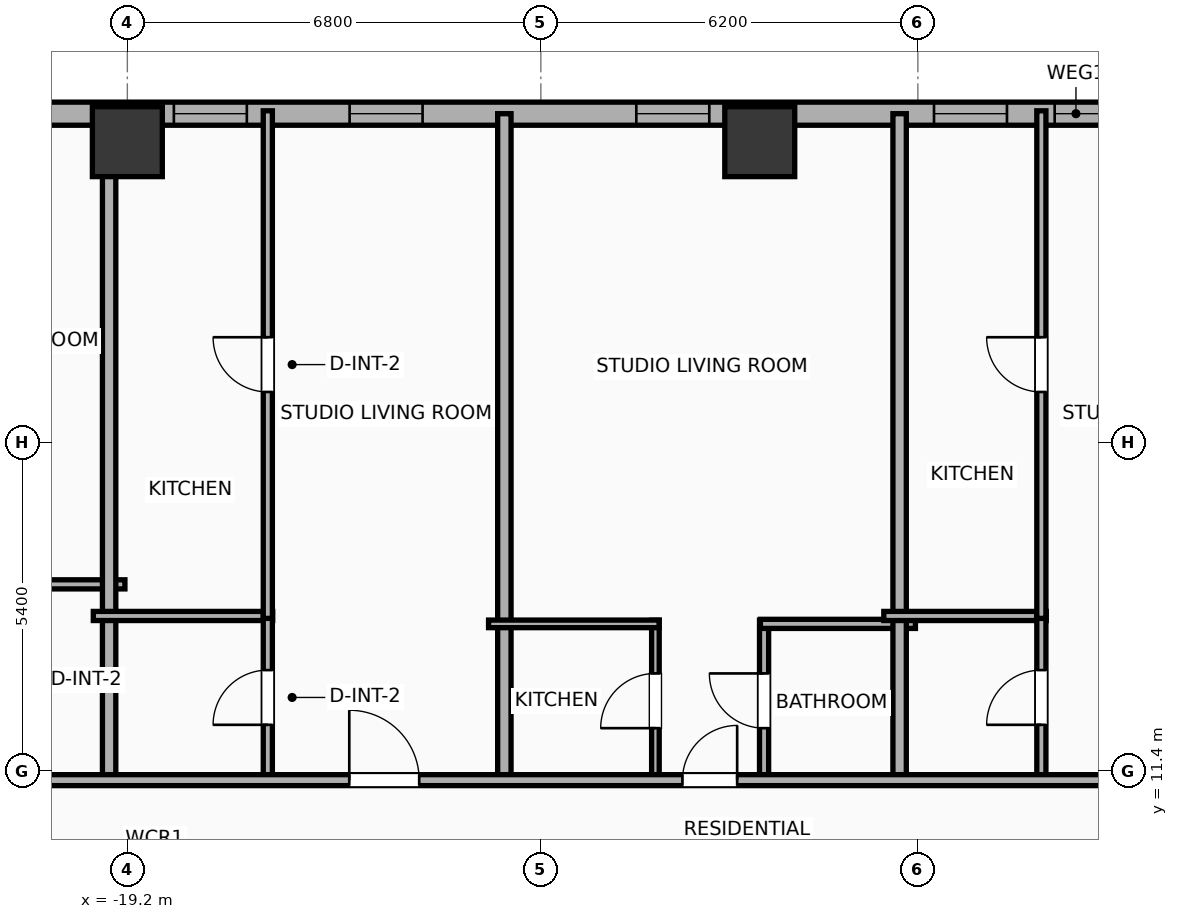
"""IFC4 building model, lengths in metres.
Left out: names, types, materials, properties, quantities, classifications, styles, units other than length and angle.
Written with IfcOpenShell. Run it as: python <this file> out.ifc"""

import sys

from ifc_helpers import new_model, si_unit, direction, frame, frame_2d, origin, origin_2d, place, context, subcontext, project, spatial, rectangle, hollow_rectangle, extrude, element, fill, save


model = new_model("IFC4")
c1 = context("Model", 3, precision=1e-05, world=origin(), true_north=direction((0.0, 1.0)))
c2 = subcontext(c1, "Body", "Model", "MODEL_VIEW")
j1 = project(units=[si_unit("LENGTHUNIT", "METRE"), si_unit("PLANEANGLEUNIT", "RADIAN")], contexts=[c1])
p1 = place(None, origin())
s1 = spatial("IfcSite", under=j1, at=p1, CompositionType="ELEMENT")
p2 = place(p1, origin())
s2 = spatial("IfcBuilding", under=s1, at=p2, CompositionType="ELEMENT")
p3 = place(p2, frame((0.0, 0.0, 76.7)))
s3 = spatial("IfcBuildingStorey", under=s2, at=p3, CompositionType="ELEMENT", Elevation=76.7)
for number, where, z_axis, x_axis in (
    (1, (-8.8, 21.75, 0.0), (0.0, 0.0, 1.0), (1.0, 0.0, 0.0)),
    (2, (-19.2, 21.75, 0.0), (0.0, 0.0, 1.0), (1.0, 0.0, 0.0)),
):
    element("IfcColumn", number, at=place(p3, frame(where, z_axis=z_axis, x_axis=x_axis)), inside=s3, PredefinedType="COLUMN", context=c2, shape_type="SweptSolid", body=[
        extrude(hollow_rectangle(XDim=1.15, YDim=1.15, WallThickness=0.04, at=origin_2d()), origin(), (0.0, 0.0, 1.0), 3.9),
    ])
p4 = place(p3, frame((-29.581, 22.21, 0.0), z_axis=(0.0, 0.0, 1.0), x_axis=(1.0, 0.0, 0.0)))
e3 = element("IfcWall", 3, at=p4, inside=s3, PredefinedType="ELEMENTEDWALL", context=c2, shape_type="SweptSolid", body=[
    extrude(rectangle(XDim=51.963, YDim=0.38, at=frame_2d((25.981, 0.0))), origin(), (0.0, 0.0, 1.0), 3.6),
])
p5 = place(p4, frame((25.631, 0.0, 0.75)))
e4 = element("IfcOpeningElement", 4, at=p5, cuts=e3, PredefinedType="OPENING", context=c2, shape_type="SweptSolid", body=[
    extrude(rectangle(XDim=2.4, YDim=2.1, at=frame_2d((1.2, 1.05))), frame((0.0, 0.2, 0.0), z_axis=(0.0, -1.0, 0.0), x_axis=(1.0, 0.0, 0.0)), (0.0, 0.0, 1.0), 0.4),
])
p6 = place(p4, frame((42.952, 0.0, 0.75)))
e5 = element("IfcOpeningElement", 5, at=p6, cuts=e3, PredefinedType="OPENING", context=c2, shape_type="SweptSolid", body=[
    extrude(rectangle(XDim=2.4, YDim=2.1, at=frame_2d((1.2, 1.05))), frame((0.0, 0.2, 0.0), z_axis=(0.0, -1.0, 0.0), x_axis=(1.0, 0.0, 0.0)), (0.0, 0.0, 1.0), 0.4),
])
p7 = place(p4, frame((1.406, 0.0, 0.75)))
e6 = element("IfcOpeningElement", 6, at=p7, cuts=e3, PredefinedType="OPENING", context=c2, shape_type="SweptSolid", body=[
    extrude(rectangle(XDim=1.2, YDim=2.05, at=frame_2d((0.6, 1.025))), frame((0.0, 0.2, 0.0), z_axis=(0.0, -1.0, 0.0), x_axis=(1.0, 0.0, 0.0)), (0.0, 0.0, 1.0), 0.4),
])
p8 = place(p4, frame((4.297, 0.0, 0.75)))
e7 = element("IfcOpeningElement", 7, at=p8, cuts=e3, PredefinedType="OPENING", context=c2, shape_type="SweptSolid", body=[
    extrude(rectangle(XDim=1.2, YDim=2.05, at=frame_2d((0.6, 1.025))), frame((0.0, 0.2, 0.0), z_axis=(0.0, -1.0, 0.0), x_axis=(1.0, 0.0, 0.0)), (0.0, 0.0, 1.0), 0.4),
])
p9 = place(p4, frame((7.776, 0.0, 0.75)))
e8 = element("IfcOpeningElement", 8, at=p9, cuts=e3, PredefinedType="OPENING", context=c2, shape_type="SweptSolid", body=[
    extrude(rectangle(XDim=1.2, YDim=2.05, at=frame_2d((0.6, 1.025))), frame((0.0, 0.2, 0.0), z_axis=(0.0, -1.0, 0.0), x_axis=(1.0, 0.0, 0.0)), (0.0, 0.0, 1.0), 0.4),
])
p10 = place(p4, frame((14.036, 0.0, 0.75)))
e9 = element("IfcOpeningElement", 9, at=p10, cuts=e3, PredefinedType="OPENING", context=c2, shape_type="SweptSolid", body=[
    extrude(rectangle(XDim=1.2, YDim=2.05, at=frame_2d((0.6, 1.025))), frame((0.0, 0.2, 0.0), z_axis=(0.0, -1.0, 0.0), x_axis=(1.0, 0.0, 0.0)), (0.0, 0.0, 1.0), 0.4),
])
p11 = place(p4, frame((11.146, 0.0, 0.75)))
e10 = element("IfcOpeningElement", 10, at=p11, cuts=e3, PredefinedType="OPENING", context=c2, shape_type="SweptSolid", body=[
    extrude(rectangle(XDim=1.2, YDim=2.05, at=frame_2d((0.6, 1.025))), frame((0.0, 0.2, 0.0), z_axis=(0.0, -1.0, 0.0), x_axis=(1.0, 0.0, 0.0)), (0.0, 0.0, 1.0), 0.4),
])
p12 = place(p4, frame((18.751, 0.0, 0.75)))
e11 = element("IfcOpeningElement", 11, at=p12, cuts=e3, PredefinedType="OPENING", context=c2, shape_type="SweptSolid", body=[
    extrude(rectangle(XDim=1.2, YDim=2.05, at=frame_2d((0.6, 1.025))), frame((0.0, 0.2, 0.0), z_axis=(0.0, -1.0, 0.0), x_axis=(1.0, 0.0, 0.0)), (0.0, 0.0, 1.0), 0.4),
])
p13 = place(p4, frame((23.647, 0.0, 0.75)))
e12 = element("IfcOpeningElement", 12, at=p13, cuts=e3, PredefinedType="OPENING", context=c2, shape_type="SweptSolid", body=[
    extrude(rectangle(XDim=1.2, YDim=2.05, at=frame_2d((0.6, 1.025))), frame((0.0, 0.2, 0.0), z_axis=(0.0, -1.0, 0.0), x_axis=(1.0, 0.0, 0.0)), (0.0, 0.0, 1.0), 0.4),
])
p14 = place(p4, frame((32.006, 0.0, 0.75)))
e13 = element("IfcOpeningElement", 13, at=p14, cuts=e3, PredefinedType="OPENING", context=c2, shape_type="SweptSolid", body=[
    extrude(rectangle(XDim=1.2, YDim=2.05, at=frame_2d((0.6, 1.025))), frame((0.0, 0.2, 0.0), z_axis=(0.0, -1.0, 0.0), x_axis=(1.0, 0.0, 0.0)), (0.0, 0.0, 1.0), 0.4),
])
p15 = place(p4, frame((34.176, 0.0, 0.75)))
e14 = element("IfcOpeningElement", 14, at=p15, cuts=e3, PredefinedType="OPENING", context=c2, shape_type="SweptSolid", body=[
    extrude(rectangle(XDim=1.2, YDim=2.05, at=frame_2d((0.6, 1.025))), frame((0.0, 0.2, 0.0), z_axis=(0.0, -1.0, 0.0), x_axis=(1.0, 0.0, 0.0)), (0.0, 0.0, 1.0), 0.4),
])
p16 = place(p4, frame((37.063, 0.0, 0.75)))
e15 = element("IfcOpeningElement", 15, at=p16, cuts=e3, PredefinedType="OPENING", context=c2, shape_type="SweptSolid", body=[
    extrude(rectangle(XDim=1.2, YDim=2.05, at=frame_2d((0.6, 1.025))), frame((0.0, 0.2, 0.0), z_axis=(0.0, -1.0, 0.0), x_axis=(1.0, 0.0, 0.0)), (0.0, 0.0, 1.0), 0.4),
])
p17 = place(p4, frame((39.509, 0.0, 0.75)))
e16 = element("IfcOpeningElement", 16, at=p17, cuts=e3, PredefinedType="OPENING", context=c2, shape_type="SweptSolid", body=[
    extrude(rectangle(XDim=1.2, YDim=2.05, at=frame_2d((0.6, 1.025))), frame((0.0, 0.2, 0.0), z_axis=(0.0, -1.0, 0.0), x_axis=(1.0, 0.0, 0.0)), (0.0, 0.0, 1.0), 0.4),
])
p18 = place(p4, frame((46.921, 0.0, 0.75)))
e17 = element("IfcOpeningElement", 17, at=p18, cuts=e3, PredefinedType="OPENING", context=c2, shape_type="SweptSolid", body=[
    extrude(rectangle(XDim=1.2, YDim=2.05, at=frame_2d((0.6, 1.025))), frame((0.0, 0.2, 0.0), z_axis=(0.0, -1.0, 0.0), x_axis=(1.0, 0.0, 0.0)), (0.0, 0.0, 1.0), 0.4),
])
p19 = place(p4, frame((49.55, 0.0, 0.75)))
e18 = element("IfcOpeningElement", 18, at=p19, cuts=e3, PredefinedType="OPENING", context=c2, shape_type="SweptSolid", body=[
    extrude(rectangle(XDim=1.2, YDim=2.05, at=frame_2d((0.6, 1.025))), frame((0.0, 0.2, 0.0), z_axis=(0.0, -1.0, 0.0), x_axis=(1.0, 0.0, 0.0)), (0.0, 0.0, 1.0), 0.4),
])
p20 = place(p3, frame((-23.03, 14.47, 0.0), z_axis=(0.0, 0.0, 1.0), x_axis=(1.0, 0.0, 0.0)))
e19 = element("IfcWall", 19, at=p20, inside=s3, PredefinedType="PLUMBINGWALL", context=c2, shape_type="SweptSolid", body=[
    extrude(rectangle(XDim=3.79, YDim=0.15, at=frame_2d((1.895, 0.0))), origin(), (0.0, 0.0, 1.0), 3.6),
])
p21 = place(p3, frame((-19.5, 11.17, 0.0), z_axis=(0.0, 0.0, 1.0), x_axis=(0.0, 1.0, 0.0)))
e20 = element("IfcWall", 20, at=p21, inside=s3, PredefinedType="PARTITIONING", context=c2, shape_type="SweptSolid", body=[
    extrude(rectangle(XDim=11.04, YDim=0.22, at=frame_2d((5.52, 0.0))), origin(), (0.0, 0.0, 1.0), 2.89),
])
p22 = place(p3, frame((-19.76, 13.95, 0.0), z_axis=(0.0, 0.0, 1.0), x_axis=(1.0, 0.0, 0.0)))
e21 = element("IfcWall", 21, at=p22, inside=s3, PredefinedType="PLUMBINGWALL", context=c2, shape_type="SweptSolid", body=[
    extrude(rectangle(XDim=2.95, YDim=0.15, at=frame_2d((1.475, 0.0))), origin(), (0.0, 0.0, 1.0), 3.6),
])
p23 = place(p3, frame((-16.89, 11.23, 0.0), z_axis=(0.0, 0.0, 1.0), x_axis=(0.0, 1.0, 0.0)))
e22 = element("IfcWall", 22, at=p23, inside=s3, PredefinedType="PLUMBINGWALL", context=c2, shape_type="SweptSolid", body=[
    extrude(rectangle(XDim=2.76, YDim=0.15, at=frame_2d((1.38, 0.0))), origin(), (0.0, 0.0, 1.0), 3.6),
])
p24 = place(p23, frame((0.93, 0.0, 0.0)))
e23 = element("IfcOpeningElement", 23, at=p24, cuts=e22, PredefinedType="OPENING", context=c2, shape_type="SweptSolid", body=[
    extrude(rectangle(XDim=0.9, YDim=2.05, at=frame_2d((0.45, 1.025))), frame((0.0, 0.085, 0.0), z_axis=(0.0, -1.0, 0.0), x_axis=(1.0, 0.0, 0.0)), (0.0, 0.0, 1.0), 0.17),
])
p25 = place(p3, frame((-16.89, 13.91, 0.0), z_axis=(0.0, 0.0, 1.0), x_axis=(0.0, 1.0, 0.0)))
e24 = element("IfcWall", 24, at=p25, inside=s3, PredefinedType="PLUMBINGWALL", context=c2, shape_type="SweptSolid", body=[
    extrude(rectangle(XDim=8.348, YDim=0.15, at=frame_2d((4.174, 0.0))), origin(), (0.0, 0.0, 1.0), 3.6),
])
p26 = place(p25, frame((3.724, 0.0, 0.0)))
e25 = element("IfcOpeningElement", 25, at=p26, cuts=e24, PredefinedType="OPENING", context=c2, shape_type="SweptSolid", body=[
    extrude(rectangle(XDim=0.9, YDim=2.05, at=frame_2d((0.45, 1.025))), frame((0.0, 0.085, 0.0), z_axis=(0.0, -1.0, 0.0), x_axis=(1.0, 0.0, 0.0)), (0.0, 0.0, 1.0), 0.17),
])
p27 = place(p3, frame((-13.0, 11.17, 0.0), z_axis=(0.0, 0.0, 1.0), x_axis=(0.0, 1.0, 0.0)))
e26 = element("IfcWall", 26, at=p27, inside=s3, PredefinedType="PARTITIONING", context=c2, shape_type="SweptSolid", body=[
    extrude(rectangle(XDim=11.04, YDim=0.22, at=frame_2d((5.52, 0.0))), origin(), (0.0, 0.0, 1.0), 3.6),
])
p28 = place(p3, frame((-10.516, 11.23, 0.0), z_axis=(0.0, 0.0, 1.0), x_axis=(0.0, 1.0, 0.0)))
e27 = element("IfcWall", 27, at=p28, inside=s3, PredefinedType="PARTITIONING", context=c2, shape_type="SweptSolid", body=[
    extrude(rectangle(XDim=2.65, YDim=0.125, at=frame_2d((1.325, 0.0))), origin(), (0.0, 0.0, 1.0), 3.6),
])
p29 = place(p28, frame((0.875, 0.0, 0.0)))
e28 = element("IfcOpeningElement", 28, at=p29, cuts=e27, PredefinedType="OPENING", context=c2, shape_type="SweptSolid", body=[
    extrude(rectangle(XDim=0.9, YDim=2.05, at=frame_2d((0.45, 1.025))), frame((0.0, 0.073, 0.0), z_axis=(0.0, -1.0, 0.0), x_axis=(1.0, 0.0, 0.0)), (0.0, 0.0, 1.0), 0.145),
])
p30 = place(p3, frame((-8.729, 11.23, 0.0), z_axis=(0.0, 0.0, 1.0), x_axis=(0.0, 1.0, 0.0)))
e29 = element("IfcWall", 29, at=p30, inside=s3, PredefinedType="PLUMBINGWALL", context=c2, shape_type="SweptSolid", body=[
    extrude(rectangle(XDim=2.65, YDim=0.15, at=frame_2d((1.325, 0.0))), origin(), (0.0, 0.0, 1.0), 3.6),
])
p31 = place(p30, frame((0.875, 0.0, 0.0)))
e30 = element("IfcOpeningElement", 30, at=p31, cuts=e29, PredefinedType="OPENING", context=c2, shape_type="SweptSolid", body=[
    extrude(rectangle(XDim=0.9, YDim=2.05, at=frame_2d((0.45, 1.025))), frame((0.0, 0.085, 0.0), z_axis=(0.0, -1.0, 0.0), x_axis=(1.0, 0.0, 0.0)), (0.0, 0.0, 1.0), 0.17),
])
p32 = place(p3, frame((-13.26, 13.82, 0.0), z_axis=(0.0, 0.0, 1.0), x_axis=(1.0, 0.0, 0.0)))
e31 = element("IfcWall", 31, at=p32, inside=s3, PredefinedType="PARTITIONING", context=c2, shape_type="SweptSolid", body=[
    extrude(rectangle(XDim=2.804, YDim=0.125, at=frame_2d((1.402, 0.0))), origin(), (0.0, 0.0, 1.0), 3.6),
])
p33 = place(p3, frame((-8.789, 13.82, 0.0), z_axis=(0.0, 0.0, 1.0), x_axis=(1.0, 0.0, 0.0)))
e32 = element("IfcWall", 32, at=p33, inside=s3, PredefinedType="PLUMBINGWALL", context=c2, shape_type="SweptSolid", body=[
    extrude(rectangle(XDim=2.549, YDim=0.15, at=frame_2d((1.274, 0.0))), origin(), (0.0, 0.0, 1.0), 3.6),
])
p34 = place(p3, frame((-6.5, 11.17, 0.0), z_axis=(0.0, 0.0, 1.0), x_axis=(0.0, 1.0, 0.0)))
e33 = element("IfcWall", 33, at=p34, inside=s3, PredefinedType="PARTITIONING", context=c2, shape_type="SweptSolid", body=[
    extrude(rectangle(XDim=11.04, YDim=0.22, at=frame_2d((5.52, 0.0))), origin(), (0.0, 0.0, 1.0), 3.6),
])
p35 = place(p3, frame((-6.76, 13.95, 0.0), z_axis=(0.0, 0.0, 1.0), x_axis=(1.0, 0.0, 0.0)))
e34 = element("IfcWall", 34, at=p35, inside=s3, PredefinedType="PLUMBINGWALL", context=c2, shape_type="SweptSolid", body=[
    extrude(rectangle(XDim=2.671, YDim=0.15, at=frame_2d((1.335, 0.0))), origin(), (0.0, 0.0, 1.0), 3.6),
])
p36 = place(p3, frame((-4.169, 11.23, 0.0), z_axis=(0.0, 0.0, 1.0), x_axis=(0.0, 1.0, 0.0)))
e35 = element("IfcWall", 35, at=p36, inside=s3, PredefinedType="PLUMBINGWALL", context=c2, shape_type="SweptSolid", body=[
    extrude(rectangle(XDim=2.76, YDim=0.15, at=frame_2d((1.38, 0.0))), origin(), (0.0, 0.0, 1.0), 3.6),
])
p37 = place(p36, frame((0.93, 0.0, 0.0)))
e36 = element("IfcOpeningElement", 36, at=p37, cuts=e35, PredefinedType="OPENING", context=c2, shape_type="SweptSolid", body=[
    extrude(rectangle(XDim=0.9, YDim=2.05, at=frame_2d((0.45, 1.025))), frame((0.0, 0.085, 0.0), z_axis=(0.0, -1.0, 0.0), x_axis=(1.0, 0.0, 0.0)), (0.0, 0.0, 1.0), 0.17),
])
p38 = place(p3, frame((-4.169, 13.91, 0.0), z_axis=(0.0, 0.0, 1.0), x_axis=(0.0, 1.0, 0.0)))
e37 = element("IfcWall", 37, at=p38, inside=s3, PredefinedType="PLUMBINGWALL", context=c2, shape_type="SweptSolid", body=[
    extrude(rectangle(XDim=8.348, YDim=0.15, at=frame_2d((4.174, 0.0))), origin(), (0.0, 0.0, 1.0), 3.6),
])
p39 = place(p38, frame((3.724, 0.0, 0.0)))
e38 = element("IfcOpeningElement", 38, at=p39, cuts=e37, PredefinedType="OPENING", context=c2, shape_type="SweptSolid", body=[
    extrude(rectangle(XDim=0.9, YDim=2.05, at=frame_2d((0.45, 1.025))), frame((0.0, 0.085, 0.0), z_axis=(0.0, -1.0, 0.0), x_axis=(1.0, 0.0, 0.0)), (0.0, 0.0, 1.0), 0.17),
])
p40 = place(p3, frame((-33.41, 11.25, 0.0), z_axis=(0.0, 0.0, 1.0), x_axis=(1.0, 0.0, 0.0)))
e39 = element("IfcWall", 39, at=p40, inside=s3, PredefinedType="PARTITIONING", context=c2, shape_type="SweptSolid", body=[
    extrude(rectangle(XDim=59.62, YDim=0.18, at=frame_2d((29.81, 0.0))), origin(), (0.0, 0.0, 1.0), 3.6),
])
p41 = place(p40, frame((3.157, 0.0, 0.0)))
e40 = element("IfcOpeningElement", 40, at=p41, cuts=e39, PredefinedType="OPENING", context=c2, shape_type="SweptSolid", body=[
    extrude(rectangle(XDim=0.9, YDim=2.05, at=frame_2d((0.45, 1.025))), frame((0.0, 0.1, 0.0), z_axis=(0.0, -1.0, 0.0), x_axis=(1.0, 0.0, 0.0)), (0.0, 0.0, 1.0), 0.2),
])
p42 = place(p40, frame((10.145, 0.0, 0.0)))
e41 = element("IfcOpeningElement", 41, at=p42, cuts=e39, PredefinedType="OPENING", context=c2, shape_type="SweptSolid", body=[
    extrude(rectangle(XDim=0.9, YDim=2.05, at=frame_2d((0.45, 1.025))), frame((0.0, 0.1, 0.0), z_axis=(0.0, -1.0, 0.0), x_axis=(1.0, 0.0, 0.0)), (0.0, 0.0, 1.0), 0.2),
])
p43 = place(p40, frame((17.86, 0.0, 0.0)))
e42 = element("IfcOpeningElement", 42, at=p43, cuts=e39, PredefinedType="OPENING", context=c2, shape_type="SweptSolid", body=[
    extrude(rectangle(XDim=1.15, YDim=2.05, at=frame_2d((0.575, 1.025))), frame((0.0, 0.1, 0.0), z_axis=(0.0, -1.0, 0.0), x_axis=(1.0, 0.0, 0.0)), (0.0, 0.0, 1.0), 0.2),
])
p44 = place(p40, frame((23.338, 0.0, 0.0)))
e43 = element("IfcOpeningElement", 43, at=p44, cuts=e39, PredefinedType="OPENING", context=c2, shape_type="SweptSolid", body=[
    extrude(rectangle(XDim=0.9, YDim=2.05, at=frame_2d((0.45, 1.025))), frame((0.0, 0.1, 0.0), z_axis=(0.0, -1.0, 0.0), x_axis=(1.0, 0.0, 0.0)), (0.0, 0.0, 1.0), 0.2),
])
p45 = place(p40, frame((30.719, 0.0, 0.0)))
e44 = element("IfcOpeningElement", 44, at=p45, cuts=e39, PredefinedType="OPENING", context=c2, shape_type="SweptSolid", body=[
    extrude(rectangle(XDim=1.15, YDim=2.05, at=frame_2d((0.575, 1.025))), frame((0.0, 0.1, 0.0), z_axis=(0.0, -1.0, 0.0), x_axis=(1.0, 0.0, 0.0)), (0.0, 0.0, 1.0), 0.2),
])
p46 = place(p40, frame((34.81, 0.0, 0.0)))
e45 = element("IfcOpeningElement", 45, at=p46, cuts=e39, PredefinedType="OPENING", context=c2, shape_type="SweptSolid", body=[
    extrude(rectangle(XDim=1.15, YDim=2.05, at=frame_2d((0.575, 1.025))), frame((0.0, 0.1, 0.0), z_axis=(0.0, -1.0, 0.0), x_axis=(1.0, 0.0, 0.0)), (0.0, 0.0, 1.0), 0.2),
])
p47 = place(p40, frame((42.912, 0.0, 0.0)))
e46 = element("IfcOpeningElement", 46, at=p47, cuts=e39, PredefinedType="OPENING", context=c2, shape_type="SweptSolid", body=[
    extrude(rectangle(XDim=0.9, YDim=2.05, at=frame_2d((0.45, 1.025))), frame((0.0, 0.1, 0.0), z_axis=(0.0, -1.0, 0.0), x_axis=(1.0, 0.0, 0.0)), (0.0, 0.0, 1.0), 0.2),
])
p48 = place(p40, frame((49.482, 0.0, 0.0)))
e47 = element("IfcOpeningElement", 47, at=p48, cuts=e39, PredefinedType="OPENING", context=c2, shape_type="SweptSolid", body=[
    extrude(rectangle(XDim=0.9, YDim=2.05, at=frame_2d((0.45, 1.025))), frame((0.0, 0.1, 0.0), z_axis=(0.0, -1.0, 0.0), x_axis=(1.0, 0.0, 0.0)), (0.0, 0.0, 1.0), 0.2),
])
p49 = place(p40, frame((56.088, 0.0, 0.0)))
e48 = element("IfcOpeningElement", 48, at=p49, cuts=e39, PredefinedType="OPENING", context=c2, shape_type="SweptSolid", body=[
    extrude(rectangle(XDim=0.9, YDim=2.05, at=frame_2d((0.45, 1.025))), frame((0.0, 0.1, 0.0), z_axis=(0.0, -1.0, 0.0), x_axis=(1.0, 0.0, 0.0)), (0.0, 0.0, 1.0), 0.2),
])
p50 = place(p5, origin())
e49 = element("IfcWindow", 49, at=p50, inside=s3, PartitioningType="SINGLE_PANEL", PredefinedType="WINDOW", context=c2, shape_type="SweptSolid", body=[
    extrude(rectangle(XDim=2.4, YDim=2.1, at=frame_2d((1.2, 1.05))), frame((0.0, 0.03, 0.0), z_axis=(0.0, -1.0, 0.0), x_axis=(1.0, 0.0, 0.0)), (0.0, 0.0, 1.0), 0.06),
])
fill(e4, e49)
p51 = place(p10, origin())
e50 = element("IfcWindow", 50, at=p51, inside=s3, PartitioningType="SINGLE_PANEL", PredefinedType="WINDOW", context=c2, shape_type="SweptSolid", body=[
    extrude(rectangle(XDim=1.2, YDim=2.05, at=frame_2d((0.6, 1.025))), frame((0.0, 0.03, 0.0), z_axis=(0.0, -1.0, 0.0), x_axis=(1.0, 0.0, 0.0)), (0.0, 0.0, 1.0), 0.06),
])
fill(e9, e50)
p52 = place(p11, origin())
e51 = element("IfcWindow", 51, at=p52, inside=s3, PartitioningType="SINGLE_PANEL", PredefinedType="WINDOW", context=c2, shape_type="SweptSolid", body=[
    extrude(rectangle(XDim=1.2, YDim=2.05, at=frame_2d((0.6, 1.025))), frame((0.0, 0.03, 0.0), z_axis=(0.0, -1.0, 0.0), x_axis=(1.0, 0.0, 0.0)), (0.0, 0.0, 1.0), 0.06),
])
fill(e10, e51)
p53 = place(p12, origin())
e52 = element("IfcWindow", 52, at=p53, inside=s3, PartitioningType="SINGLE_PANEL", PredefinedType="WINDOW", context=c2, shape_type="SweptSolid", body=[
    extrude(rectangle(XDim=1.2, YDim=2.05, at=frame_2d((0.6, 1.025))), frame((0.0, 0.03, 0.0), z_axis=(0.0, -1.0, 0.0), x_axis=(1.0, 0.0, 0.0)), (0.0, 0.0, 1.0), 0.06),
])
fill(e11, e52)
p54 = place(p13, origin())
e53 = element("IfcWindow", 53, at=p54, inside=s3, PartitioningType="SINGLE_PANEL", PredefinedType="WINDOW", context=c2, shape_type="SweptSolid", body=[
    extrude(rectangle(XDim=1.2, YDim=2.05, at=frame_2d((0.6, 1.025))), frame((0.0, 0.03, 0.0), z_axis=(0.0, -1.0, 0.0), x_axis=(1.0, 0.0, 0.0)), (0.0, 0.0, 1.0), 0.06),
])
fill(e12, e53)
p55 = place(p24, origin())
e54 = element("IfcDoor", 54, at=p55, inside=s3, OperationType="SINGLE_SWING_LEFT", PredefinedType="DOOR", context=c2, shape_type="SweptSolid", body=[
    extrude(rectangle(XDim=0.9, YDim=2.05, at=frame_2d((0.45, 1.025))), frame((0.0, 0.025, 0.0), z_axis=(0.0, -1.0, 0.0), x_axis=(1.0, 0.0, 0.0)), (0.0, 0.0, 1.0), 0.05),
])
fill(e23, e54)
p56 = place(p26, origin())
e55 = element("IfcDoor", 55, at=p56, inside=s3, OperationType="SINGLE_SWING_RIGHT", PredefinedType="DOOR", context=c2, shape_type="SweptSolid", body=[
    extrude(rectangle(XDim=0.9, YDim=2.05, at=frame_2d((0.45, 1.025))), frame((0.0, 0.025, 0.0), z_axis=(0.0, -1.0, 0.0), x_axis=(1.0, 0.0, 0.0)), (0.0, 0.0, 1.0), 0.05),
])
fill(e25, e55)
p57 = place(p29, origin())
e56 = element("IfcDoor", 56, at=p57, inside=s3, OperationType="SINGLE_SWING_LEFT", PredefinedType="DOOR", context=c2, shape_type="SweptSolid", body=[
    extrude(rectangle(XDim=0.9, YDim=2.05, at=frame_2d((0.45, 1.025))), frame((0.0, 0.025, 0.0), z_axis=(0.0, -1.0, 0.0), x_axis=(1.0, 0.0, 0.0)), (0.0, 0.0, 1.0), 0.05),
])
fill(e28, e56)
p58 = place(p31, origin())
e57 = element("IfcDoor", 57, at=p58, inside=s3, OperationType="SINGLE_SWING_RIGHT", PredefinedType="DOOR", context=c2, shape_type="SweptSolid", body=[
    extrude(rectangle(XDim=0.9, YDim=2.05, at=frame_2d((0.45, 1.025))), frame((0.0, 0.025, 0.0), z_axis=(0.0, -1.0, 0.0), x_axis=(1.0, 0.0, 0.0)), (0.0, 0.0, 1.0), 0.05),
])
fill(e30, e57)
p59 = place(p37, origin())
e58 = element("IfcDoor", 58, at=p59, inside=s3, OperationType="SINGLE_SWING_LEFT", PredefinedType="DOOR", context=c2, shape_type="SweptSolid", body=[
    extrude(rectangle(XDim=0.9, YDim=2.05, at=frame_2d((0.45, 1.025))), frame((0.0, 0.025, 0.0), z_axis=(0.0, -1.0, 0.0), x_axis=(1.0, 0.0, 0.0)), (0.0, 0.0, 1.0), 0.05),
])
fill(e36, e58)
p60 = place(p39, origin())
e59 = element("IfcDoor", 59, at=p60, inside=s3, OperationType="SINGLE_SWING_RIGHT", PredefinedType="DOOR", context=c2, shape_type="SweptSolid", body=[
    extrude(rectangle(XDim=0.9, YDim=2.05, at=frame_2d((0.45, 1.025))), frame((0.0, 0.025, 0.0), z_axis=(0.0, -1.0, 0.0), x_axis=(1.0, 0.0, 0.0)), (0.0, 0.0, 1.0), 0.05),
])
fill(e38, e59)
p61 = place(p43, origin())
e60 = element("IfcDoor", 60, at=p61, inside=s3, OperationType="SINGLE_SWING_LEFT", PredefinedType="DOOR", context=c2, shape_type="SweptSolid", body=[
    extrude(rectangle(XDim=1.15, YDim=2.05, at=frame_2d((0.575, 1.025))), frame((0.0, 0.025, 0.0), z_axis=(0.0, -1.0, 0.0), x_axis=(1.0, 0.0, 0.0)), (0.0, 0.0, 1.0), 0.05),
])
fill(e42, e60)
p62 = place(p44, origin())
e61 = element("IfcDoor", 61, at=p62, inside=s3, OperationType="SINGLE_SWING_RIGHT", PredefinedType="DOOR", context=c2, shape_type="SweptSolid", body=[
    extrude(rectangle(XDim=0.9, YDim=2.05, at=frame_2d((0.45, 1.025))), frame((0.0, 0.025, 0.0), z_axis=(0.0, -1.0, 0.0), x_axis=(1.0, 0.0, 0.0)), (0.0, 0.0, 1.0), 0.05),
])
fill(e43, e61)
save(model, sys.argv[1])
